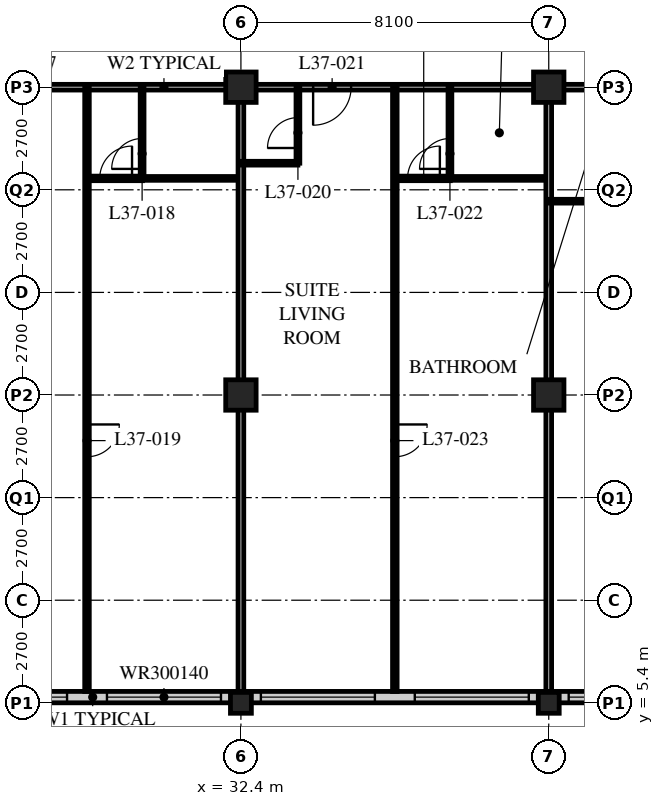
"""IFC4 building model, lengths in metres.
Left out: names, types, materials, properties, quantities, classifications, styles, units other than length and angle.
Written with IfcOpenShell. Run it as: python <this file> out.ifc"""

import sys

from ifc_helpers import new_model, si_unit, direction, frame, frame_2d, origin, origin_2d, place, context, subcontext, project, spatial, rectangle, hollow_rectangle, extrude, element, fill, save


model = new_model("IFC4")
c1 = context("Model", 3, precision=1e-05, world=origin(), true_north=direction((0.0, 1.0)))
c2 = subcontext(c1, "Body", "Model", "MODEL_VIEW")
j1 = project(units=[si_unit("LENGTHUNIT", "METRE"), si_unit("PLANEANGLEUNIT", "RADIAN")], contexts=[c1])
p1 = place(None, origin())
s1 = spatial("IfcSite", under=j1, at=p1, CompositionType="ELEMENT")
p2 = place(p1, origin())
s2 = spatial("IfcBuilding", under=s1, at=p2, CompositionType="ELEMENT")
p3 = place(p2, frame((0.0, 0.0, 144.2)))
s3 = spatial("IfcBuildingStorey", under=s2, at=p3, CompositionType="ELEMENT", Elevation=144.2)
p4 = place(p3, frame((32.4, 5.4, 0.0), z_axis=(0.0, 0.0, 1.0), x_axis=(1.0, 0.0, 0.0)))
e1 = element("IfcColumn", 1, at=p4, inside=s3, PredefinedType="COLUMN", context=c2, shape_type="SweptSolid", body=[
    extrude(hollow_rectangle(XDim=0.55, YDim=0.55, WallThickness=0.04, at=origin_2d()), origin(), (0.0, 0.0, 1.0), 3.4),
])
for number, where, z_axis, x_axis in (
    (2, (32.4, 13.5, 0.0), (0.0, 0.0, 1.0), (1.0, 0.0, 0.0)),
    (3, (32.4, 21.6, 0.0), (0.0, 0.0, 1.0), (1.0, 0.0, 0.0)),
):
    element("IfcColumn", number, at=place(p3, frame(where, z_axis=z_axis, x_axis=x_axis)), inside=s3, PredefinedType="COLUMN", context=c2, shape_type="SweptSolid", body=[
        extrude(hollow_rectangle(XDim=0.8, YDim=0.8, WallThickness=0.08, at=origin_2d()), origin(), (0.0, 0.0, 1.0), 3.4),
    ])
p5 = place(p3, frame((40.5, 5.4, 0.0), z_axis=(0.0, 0.0, 1.0), x_axis=(1.0, 0.0, 0.0)))
e4 = element("IfcColumn", 4, at=p5, inside=s3, PredefinedType="COLUMN", context=c2, shape_type="SweptSolid", body=[
    extrude(hollow_rectangle(XDim=0.55, YDim=0.55, WallThickness=0.04, at=origin_2d()), origin(), (0.0, 0.0, 1.0), 3.4),
])
for number, where, z_axis, x_axis in (
    (5, (40.5, 13.5, 0.0), (0.0, 0.0, 1.0), (1.0, 0.0, 0.0)),
    (6, (40.5, 21.6, 0.0), (0.0, 0.0, 1.0), (1.0, 0.0, 0.0)),
):
    element("IfcColumn", number, at=place(p3, frame(where, z_axis=z_axis, x_axis=x_axis)), inside=s3, PredefinedType="COLUMN", context=c2, shape_type="SweptSolid", body=[
        extrude(hollow_rectangle(XDim=0.8, YDim=0.8, WallThickness=0.08, at=origin_2d()), origin(), (0.0, 0.0, 1.0), 3.4),
    ])
p6 = place(p3, frame((8.4, 5.55, 0.0), z_axis=(0.0, 0.0, 1.0), x_axis=(1.0, 0.0, 0.0)))
e7 = element("IfcWall", 7, at=p6, inside=s3, PredefinedType="SOLIDWALL", context=c2, shape_type="SweptSolid", body=[
    extrude(rectangle(XDim=40.2, YDim=0.3, at=frame_2d((20.1, 0.0))), origin(), (0.0, 0.0, 1.0), 3.19),
])
p7 = place(p6, frame((0.225, 0.0, 0.9)))
e8 = element("IfcOpeningElement", 8, at=p7, cuts=e7, PredefinedType="OPENING", context=c2, shape_type="SweptSolid", body=[
    extrude(rectangle(XDim=3.0, YDim=1.4, at=frame_2d((1.5, 0.7))), frame((0.0, 0.16, 0.0), z_axis=(0.0, -1.0, 0.0), x_axis=(1.0, 0.0, 0.0)), (0.0, 0.0, 1.0), 0.32),
])
p8 = place(p6, frame((4.275, 0.0, 0.9)))
e9 = element("IfcOpeningElement", 9, at=p8, cuts=e7, PredefinedType="OPENING", context=c2, shape_type="SweptSolid", body=[
    extrude(rectangle(XDim=3.0, YDim=1.4, at=frame_2d((1.5, 0.7))), frame((0.0, 0.16, 0.0), z_axis=(0.0, -1.0, 0.0), x_axis=(1.0, 0.0, 0.0)), (0.0, 0.0, 1.0), 0.32),
])
p9 = place(p6, frame((8.325, 0.0, 0.9)))
e10 = element("IfcOpeningElement", 10, at=p9, cuts=e7, PredefinedType="OPENING", context=c2, shape_type="SweptSolid", body=[
    extrude(rectangle(XDim=3.0, YDim=1.4, at=frame_2d((1.5, 0.7))), frame((0.0, 0.16, 0.0), z_axis=(0.0, -1.0, 0.0), x_axis=(1.0, 0.0, 0.0)), (0.0, 0.0, 1.0), 0.32),
])
p10 = place(p6, frame((12.375, 0.0, 0.9)))
e11 = element("IfcOpeningElement", 11, at=p10, cuts=e7, PredefinedType="OPENING", context=c2, shape_type="SweptSolid", body=[
    extrude(rectangle(XDim=3.0, YDim=1.4, at=frame_2d((1.5, 0.7))), frame((0.0, 0.16, 0.0), z_axis=(0.0, -1.0, 0.0), x_axis=(1.0, 0.0, 0.0)), (0.0, 0.0, 1.0), 0.32),
])
p11 = place(p6, frame((16.425, 0.0, 0.9)))
e12 = element("IfcOpeningElement", 12, at=p11, cuts=e7, PredefinedType="OPENING", context=c2, shape_type="SweptSolid", body=[
    extrude(rectangle(XDim=3.0, YDim=1.4, at=frame_2d((1.5, 0.7))), frame((0.0, 0.16, 0.0), z_axis=(0.0, -1.0, 0.0), x_axis=(1.0, 0.0, 0.0)), (0.0, 0.0, 1.0), 0.32),
])
p12 = place(p6, frame((20.475, 0.0, 0.9)))
e13 = element("IfcOpeningElement", 13, at=p12, cuts=e7, PredefinedType="OPENING", context=c2, shape_type="SweptSolid", body=[
    extrude(rectangle(XDim=3.0, YDim=1.4, at=frame_2d((1.5, 0.7))), frame((0.0, 0.16, 0.0), z_axis=(0.0, -1.0, 0.0), x_axis=(1.0, 0.0, 0.0)), (0.0, 0.0, 1.0), 0.32),
])
p13 = place(p6, frame((24.525, 0.0, 0.9)))
e14 = element("IfcOpeningElement", 14, at=p13, cuts=e7, PredefinedType="OPENING", context=c2, shape_type="SweptSolid", body=[
    extrude(rectangle(XDim=3.0, YDim=1.4, at=frame_2d((1.5, 0.7))), frame((0.0, 0.16, 0.0), z_axis=(0.0, -1.0, 0.0), x_axis=(1.0, 0.0, 0.0)), (0.0, 0.0, 1.0), 0.32),
])
p14 = place(p6, frame((28.575, 0.0, 0.9)))
e15 = element("IfcOpeningElement", 15, at=p14, cuts=e7, PredefinedType="OPENING", context=c2, shape_type="SweptSolid", body=[
    extrude(rectangle(XDim=3.0, YDim=1.4, at=frame_2d((1.5, 0.7))), frame((0.0, 0.16, 0.0), z_axis=(0.0, -1.0, 0.0), x_axis=(1.0, 0.0, 0.0)), (0.0, 0.0, 1.0), 0.32),
])
p15 = place(p6, frame((32.625, 0.0, 0.9)))
e16 = element("IfcOpeningElement", 16, at=p15, cuts=e7, PredefinedType="OPENING", context=c2, shape_type="SweptSolid", body=[
    extrude(rectangle(XDim=3.0, YDim=1.4, at=frame_2d((1.5, 0.7))), frame((0.0, 0.16, 0.0), z_axis=(0.0, -1.0, 0.0), x_axis=(1.0, 0.0, 0.0)), (0.0, 0.0, 1.0), 0.32),
])
p16 = place(p6, frame((36.675, 0.0, 0.9)))
e17 = element("IfcOpeningElement", 17, at=p16, cuts=e7, PredefinedType="OPENING", context=c2, shape_type="SweptSolid", body=[
    extrude(rectangle(XDim=3.0, YDim=1.4, at=frame_2d((1.5, 0.7))), frame((0.0, 0.16, 0.0), z_axis=(0.0, -1.0, 0.0), x_axis=(1.0, 0.0, 0.0)), (0.0, 0.0, 1.0), 0.32),
])
p17 = place(p3, frame((12.15, 21.6, 0.0), z_axis=(0.0, 0.0, 1.0), x_axis=(1.0, 0.0, 0.0)))
e18 = element("IfcWall", 18, at=p17, inside=s3, PredefinedType="PARTITIONING", context=c2, shape_type="SweptSolid", body=[
    extrude(rectangle(XDim=36.45, YDim=0.15, at=frame_2d((18.225, 0.0))), origin(), (0.0, 0.0, 1.0), 2.42),
])
p18 = place(p17, frame((5.95, 0.0, 0.0)))
e19 = element("IfcOpeningElement", 19, at=p18, cuts=e18, PredefinedType="OPENING", context=c2, shape_type="SweptSolid", body=[
    extrude(rectangle(XDim=1.0, YDim=2.1, at=frame_2d((0.5, 1.05))), frame((0.0, 0.085, 0.0), z_axis=(0.0, -1.0, 0.0), x_axis=(1.0, 0.0, 0.0)), (0.0, 0.0, 1.0), 0.17),
])
p19 = place(p17, frame((14.05, 0.0, 0.0)))
e20 = element("IfcOpeningElement", 20, at=p19, cuts=e18, PredefinedType="OPENING", context=c2, shape_type="SweptSolid", body=[
    extrude(rectangle(XDim=1.0, YDim=2.1, at=frame_2d((0.5, 1.05))), frame((0.0, 0.085, 0.0), z_axis=(0.0, -1.0, 0.0), x_axis=(1.0, 0.0, 0.0)), (0.0, 0.0, 1.0), 0.17),
])
p20 = place(p17, frame((22.15, 0.0, 0.0)))
e21 = element("IfcOpeningElement", 21, at=p20, cuts=e18, PredefinedType="OPENING", context=c2, shape_type="SweptSolid", body=[
    extrude(rectangle(XDim=1.0, YDim=2.1, at=frame_2d((0.5, 1.05))), frame((0.0, 0.085, 0.0), z_axis=(0.0, -1.0, 0.0), x_axis=(1.0, 0.0, 0.0)), (0.0, 0.0, 1.0), 0.17),
])
p21 = place(p17, frame((30.8, 0.0, 0.0)))
e22 = element("IfcOpeningElement", 22, at=p21, cuts=e18, PredefinedType="OPENING", context=c2, shape_type="SweptSolid", body=[
    extrude(rectangle(XDim=1.0, YDim=2.1, at=frame_2d((0.5, 1.05))), frame((0.0, 0.085, 0.0), z_axis=(0.0, -1.0, 0.0), x_axis=(1.0, 0.0, 0.0)), (0.0, 0.0, 1.0), 0.17),
])
p22 = place(p17, frame((1.525, 0.0, 0.0)))
e23 = element("IfcOpeningElement", 23, at=p22, cuts=e18, PredefinedType="OPENING", context=c2, shape_type="SweptSolid", body=[
    extrude(rectangle(XDim=1.0, YDim=2.1, at=frame_2d((0.5, 1.05))), frame((0.0, 0.085, 0.0), z_axis=(0.0, -1.0, 0.0), x_axis=(1.0, 0.0, 0.0)), (0.0, 0.0, 1.0), 0.17),
])
p23 = place(p17, frame((33.925, 0.0, 0.0)))
e24 = element("IfcOpeningElement", 24, at=p23, cuts=e18, PredefinedType="OPENING", context=c2, shape_type="SweptSolid", body=[
    extrude(rectangle(XDim=1.0, YDim=2.1, at=frame_2d((0.5, 1.05))), frame((0.0, 0.085, 0.0), z_axis=(0.0, -1.0, 0.0), x_axis=(1.0, 0.0, 0.0)), (0.0, 0.0, 1.0), 0.17),
])
p24 = place(p3, frame((29.8, 19.2, 0.0), z_axis=(0.0, 0.0, 1.0), x_axis=(1.0, 0.0, 0.0)))
e25 = element("IfcWall", 25, at=p24, inside=s3, PredefinedType="PARTITIONING", context=c2, shape_type="SweptSolid", body=[
    extrude(rectangle(XDim=2.6, YDim=0.1, at=frame_2d((1.3, 0.0))), origin(), (0.0, 0.0, 1.0), 3.19),
])
p25 = place(p3, frame((29.8, 21.6, 0.0), z_axis=(0.0, 0.0, 1.0), x_axis=(0.0, -1.0, 0.0)))
e26 = element("IfcWall", 26, at=p25, inside=s3, PredefinedType="PARTITIONING", context=c2, shape_type="SweptSolid", body=[
    extrude(rectangle(XDim=2.4, YDim=0.1, at=frame_2d((1.2, 0.0))), origin(), (0.0, 0.0, 1.0), 3.19),
])
p26 = place(p25, frame((1.35, 0.0, 0.0)))
e27 = element("IfcOpeningElement", 27, at=p26, cuts=e26, PredefinedType="OPENING", context=c2, shape_type="SweptSolid", body=[
    extrude(rectangle(XDim=0.8, YDim=2.1, at=frame_2d((0.4, 1.05))), frame((0.0, 0.06, 0.0), z_axis=(0.0, -1.0, 0.0), x_axis=(1.0, 0.0, 0.0)), (0.0, 0.0, 1.0), 0.12),
])
p27 = place(p3, frame((28.35, 21.6, 0.0), z_axis=(0.0, 0.0, 1.0), x_axis=(0.0, -1.0, 0.0)))
e28 = element("IfcWall", 28, at=p27, inside=s3, PredefinedType="PARTITIONING", context=c2, shape_type="SweptSolid", body=[
    extrude(rectangle(XDim=15.9, YDim=0.12, at=frame_2d((7.95, 0.0))), origin(), (0.0, 0.0, 1.0), 3.19),
])
p28 = place(p27, frame((8.875, 0.0, 0.0)))
e29 = element("IfcOpeningElement", 29, at=p28, cuts=e28, PredefinedType="OPENING", context=c2, shape_type="SweptSolid", body=[
    extrude(rectangle(XDim=0.85, YDim=2.1, at=frame_2d((0.425, 1.05))), frame((0.0, 0.07, 0.0), z_axis=(0.0, -1.0, 0.0), x_axis=(1.0, 0.0, 0.0)), (0.0, 0.0, 1.0), 0.14),
])
p29 = place(p3, frame((32.4, 21.6, 0.0), z_axis=(0.0, 0.0, 1.0), x_axis=(0.0, -1.0, 0.0)))
e30 = element("IfcWall", 30, at=p29, inside=s3, PredefinedType="PARTITIONING", context=c2, shape_type="SweptSolid", body=[
    extrude(rectangle(XDim=15.9, YDim=0.15, at=frame_2d((7.95, 0.0))), origin(), (0.0, 0.0, 1.0), 2.42),
])
p30 = place(p3, frame((32.4, 19.6, 0.0), z_axis=(0.0, 0.0, 1.0), x_axis=(1.0, 0.0, 0.0)))
e31 = element("IfcWall", 31, at=p30, inside=s3, PredefinedType="PARTITIONING", context=c2, shape_type="SweptSolid", body=[
    extrude(rectangle(XDim=1.5, YDim=0.1, at=frame_2d((0.75, 0.0))), origin(), (0.0, 0.0, 1.0), 3.19),
])
p31 = place(p3, frame((33.9, 21.6, 0.0), z_axis=(0.0, 0.0, 1.0), x_axis=(0.0, -1.0, 0.0)))
e32 = element("IfcWall", 32, at=p31, inside=s3, PredefinedType="PARTITIONING", context=c2, shape_type="SweptSolid", body=[
    extrude(rectangle(XDim=2.0, YDim=0.1, at=frame_2d((1.0, 0.0))), origin(), (0.0, 0.0, 1.0), 3.19),
])
p32 = place(p31, frame((0.8, 0.0, 0.0)))
e33 = element("IfcOpeningElement", 33, at=p32, cuts=e32, PredefinedType="OPENING", context=c2, shape_type="SweptSolid", body=[
    extrude(rectangle(XDim=0.8, YDim=2.1, at=frame_2d((0.4, 1.05))), frame((0.0, 0.06, 0.0), z_axis=(0.0, -1.0, 0.0), x_axis=(1.0, 0.0, 0.0)), (0.0, 0.0, 1.0), 0.12),
])
p33 = place(p3, frame((37.9, 19.2, 0.0), z_axis=(0.0, 0.0, 1.0), x_axis=(1.0, 0.0, 0.0)))
e34 = element("IfcWall", 34, at=p33, inside=s3, PredefinedType="PARTITIONING", context=c2, shape_type="SweptSolid", body=[
    extrude(rectangle(XDim=2.6, YDim=0.1, at=frame_2d((1.3, 0.0))), origin(), (0.0, 0.0, 1.0), 3.19),
])
p34 = place(p3, frame((37.9, 21.6, 0.0), z_axis=(0.0, 0.0, 1.0), x_axis=(0.0, -1.0, 0.0)))
e35 = element("IfcWall", 35, at=p34, inside=s3, PredefinedType="PARTITIONING", context=c2, shape_type="SweptSolid", body=[
    extrude(rectangle(XDim=2.4, YDim=0.1, at=frame_2d((1.2, 0.0))), origin(), (0.0, 0.0, 1.0), 3.19),
])
p35 = place(p34, frame((1.35, 0.0, 0.0)))
e36 = element("IfcOpeningElement", 36, at=p35, cuts=e35, PredefinedType="OPENING", context=c2, shape_type="SweptSolid", body=[
    extrude(rectangle(XDim=0.8, YDim=2.1, at=frame_2d((0.4, 1.05))), frame((0.0, 0.06, 0.0), z_axis=(0.0, -1.0, 0.0), x_axis=(1.0, 0.0, 0.0)), (0.0, 0.0, 1.0), 0.12),
])
p36 = place(p3, frame((36.45, 21.6, 0.0), z_axis=(0.0, 0.0, 1.0), x_axis=(0.0, -1.0, 0.0)))
e37 = element("IfcWall", 37, at=p36, inside=s3, PredefinedType="PARTITIONING", context=c2, shape_type="SweptSolid", body=[
    extrude(rectangle(XDim=15.9, YDim=0.12, at=frame_2d((7.95, 0.0))), origin(), (0.0, 0.0, 1.0), 3.19),
])
p37 = place(p36, frame((8.875, 0.0, 0.0)))
e38 = element("IfcOpeningElement", 38, at=p37, cuts=e37, PredefinedType="OPENING", context=c2, shape_type="SweptSolid", body=[
    extrude(rectangle(XDim=0.85, YDim=2.1, at=frame_2d((0.425, 1.05))), frame((0.0, 0.07, 0.0), z_axis=(0.0, -1.0, 0.0), x_axis=(1.0, 0.0, 0.0)), (0.0, 0.0, 1.0), 0.14),
])
p38 = place(p3, frame((40.5, 21.6, 0.0), z_axis=(0.0, 0.0, 1.0), x_axis=(0.0, -1.0, 0.0)))
e39 = element("IfcWall", 39, at=p38, inside=s3, PredefinedType="PARTITIONING", context=c2, shape_type="SweptSolid", body=[
    extrude(rectangle(XDim=15.9, YDim=0.15, at=frame_2d((7.95, 0.0))), origin(), (0.0, 0.0, 1.0), 2.42),
])
p39 = place(p3, frame((40.5, 18.6, 0.0), z_axis=(0.0, 0.0, 1.0), x_axis=(1.0, 0.0, 0.0)))
e40 = element("IfcWall", 40, at=p39, inside=s3, PredefinedType="PARTITIONING", context=c2, shape_type="SweptSolid", body=[
    extrude(rectangle(XDim=2.3, YDim=0.1, at=frame_2d((1.15, 0.0))), origin(), (0.0, 0.0, 1.0), 3.19),
])
p40 = place(p3, frame((29.81, 19.2, 0.0), z_axis=(0.0, 0.0, 1.0), x_axis=(-1.0, 0.0, 0.0)))
e41 = element("IfcWall", 41, at=p40, inside=s3, PredefinedType="PARTITIONING", context=c2, shape_type="SweptSolid", body=[
    extrude(rectangle(XDim=1.46, YDim=0.12, at=frame_2d((0.73, 0.0))), origin(), (0.0, 0.0, 1.0), 3.19),
])
p41 = place(p40, frame((0.275, 0.0, 0.0)))
e42 = element("IfcOpeningElement", 42, at=p41, cuts=e41, PredefinedType="OPENING", context=c2, shape_type="SweptSolid", body=[
    extrude(rectangle(XDim=0.85, YDim=2.1, at=frame_2d((0.425, 1.05))), frame((0.0, 0.07, 0.0), z_axis=(0.0, -1.0, 0.0), x_axis=(1.0, 0.0, 0.0)), (0.0, 0.0, 1.0), 0.14),
])
p42 = place(p3, frame((37.91, 19.2, 0.0), z_axis=(0.0, 0.0, 1.0), x_axis=(-1.0, 0.0, 0.0)))
e43 = element("IfcWall", 43, at=p42, inside=s3, PredefinedType="PARTITIONING", context=c2, shape_type="SweptSolid", body=[
    extrude(rectangle(XDim=1.46, YDim=0.12, at=frame_2d((0.73, 0.0))), origin(), (0.0, 0.0, 1.0), 3.19),
])
p43 = place(p42, frame((0.275, 0.0, 0.0)))
e44 = element("IfcOpeningElement", 44, at=p43, cuts=e43, PredefinedType="OPENING", context=c2, shape_type="SweptSolid", body=[
    extrude(rectangle(XDim=0.85, YDim=2.1, at=frame_2d((0.425, 1.05))), frame((0.0, 0.07, 0.0), z_axis=(0.0, -1.0, 0.0), x_axis=(1.0, 0.0, 0.0)), (0.0, 0.0, 1.0), 0.14),
])
p44 = place(p11, origin())
e45 = element("IfcWindow", 45, at=p44, inside=s3, PartitioningType="SINGLE_PANEL", PredefinedType="WINDOW", context=c2, shape_type="SweptSolid", body=[
    extrude(rectangle(XDim=3.0, YDim=1.4, at=frame_2d((1.5, 0.7))), frame((0.0, 0.03, 0.0), z_axis=(0.0, -1.0, 0.0), x_axis=(1.0, 0.0, 0.0)), (0.0, 0.0, 1.0), 0.06),
])
fill(e12, e45)
p45 = place(p12, origin())
e46 = element("IfcWindow", 46, at=p45, inside=s3, PartitioningType="SINGLE_PANEL", PredefinedType="WINDOW", context=c2, shape_type="SweptSolid", body=[
    extrude(rectangle(XDim=3.0, YDim=1.4, at=frame_2d((1.5, 0.7))), frame((0.0, 0.03, 0.0), z_axis=(0.0, -1.0, 0.0), x_axis=(1.0, 0.0, 0.0)), (0.0, 0.0, 1.0), 0.06),
])
fill(e13, e46)
p46 = place(p13, origin())
e47 = element("IfcWindow", 47, at=p46, inside=s3, PartitioningType="SINGLE_PANEL", PredefinedType="WINDOW", context=c2, shape_type="SweptSolid", body=[
    extrude(rectangle(XDim=3.0, YDim=1.4, at=frame_2d((1.5, 0.7))), frame((0.0, 0.03, 0.0), z_axis=(0.0, -1.0, 0.0), x_axis=(1.0, 0.0, 0.0)), (0.0, 0.0, 1.0), 0.06),
])
fill(e14, e47)
p47 = place(p14, origin())
e48 = element("IfcWindow", 48, at=p47, inside=s3, PartitioningType="SINGLE_PANEL", PredefinedType="WINDOW", context=c2, shape_type="SweptSolid", body=[
    extrude(rectangle(XDim=3.0, YDim=1.4, at=frame_2d((1.5, 0.7))), frame((0.0, 0.03, 0.0), z_axis=(0.0, -1.0, 0.0), x_axis=(1.0, 0.0, 0.0)), (0.0, 0.0, 1.0), 0.06),
])
fill(e15, e48)
p48 = place(p15, origin())
e49 = element("IfcWindow", 49, at=p48, inside=s3, PartitioningType="SINGLE_PANEL", PredefinedType="WINDOW", context=c2, shape_type="SweptSolid", body=[
    extrude(rectangle(XDim=3.0, YDim=1.4, at=frame_2d((1.5, 0.7))), frame((0.0, 0.03, 0.0), z_axis=(0.0, -1.0, 0.0), x_axis=(1.0, 0.0, 0.0)), (0.0, 0.0, 1.0), 0.06),
])
fill(e16, e49)
p49 = place(p26, origin())
e50 = element("IfcDoor", 50, at=p49, inside=s3, OperationType="SINGLE_SWING_LEFT", PredefinedType="DOOR", context=c2, shape_type="SweptSolid", body=[
    extrude(rectangle(XDim=0.8, YDim=2.1, at=frame_2d((0.4, 1.05))), frame((0.0, 0.025, 0.0), z_axis=(0.0, -1.0, 0.0), x_axis=(1.0, 0.0, 0.0)), (0.0, 0.0, 1.0), 0.05),
])
fill(e27, e50)
p50 = place(p28, origin())
e51 = element("IfcDoor", 51, at=p50, inside=s3, OperationType="SINGLE_SWING_LEFT", PredefinedType="DOOR", context=c2, shape_type="SweptSolid", body=[
    extrude(rectangle(XDim=0.85, YDim=2.1, at=frame_2d((0.425, 1.05))), frame((0.0, 0.025, 0.0), z_axis=(0.0, -1.0, 0.0), x_axis=(1.0, 0.0, 0.0)), (0.0, 0.0, 1.0), 0.05),
])
fill(e29, e51)
p51 = place(p32, origin())
e52 = element("IfcDoor", 52, at=p51, inside=s3, OperationType="SINGLE_SWING_LEFT", PredefinedType="DOOR", context=c2, shape_type="SweptSolid", body=[
    extrude(rectangle(XDim=0.8, YDim=2.1, at=frame_2d((0.4, 1.05))), frame((0.0, 0.025, 0.0), z_axis=(0.0, -1.0, 0.0), x_axis=(1.0, 0.0, 0.0)), (0.0, 0.0, 1.0), 0.05),
])
fill(e33, e52)
p52 = place(p20, origin())
e53 = element("IfcDoor", 53, at=p52, inside=s3, OperationType="SINGLE_SWING_RIGHT", PredefinedType="DOOR", context=c2, shape_type="SweptSolid", body=[
    extrude(rectangle(XDim=1.0, YDim=2.1, at=frame_2d((0.5, 1.05))), frame((0.0, 0.025, 0.0), z_axis=(0.0, -1.0, 0.0), x_axis=(1.0, 0.0, 0.0)), (0.0, 0.0, 1.0), 0.05),
])
fill(e21, e53)
p53 = place(p35, origin())
e54 = element("IfcDoor", 54, at=p53, inside=s3, OperationType="SINGLE_SWING_LEFT", PredefinedType="DOOR", context=c2, shape_type="SweptSolid", body=[
    extrude(rectangle(XDim=0.8, YDim=2.1, at=frame_2d((0.4, 1.05))), frame((0.0, 0.025, 0.0), z_axis=(0.0, -1.0, 0.0), x_axis=(1.0, 0.0, 0.0)), (0.0, 0.0, 1.0), 0.05),
])
fill(e36, e54)
p54 = place(p37, origin())
e55 = element("IfcDoor", 55, at=p54, inside=s3, OperationType="SINGLE_SWING_LEFT", PredefinedType="DOOR", context=c2, shape_type="SweptSolid", body=[
    extrude(rectangle(XDim=0.85, YDim=2.1, at=frame_2d((0.425, 1.05))), frame((0.0, 0.025, 0.0), z_axis=(0.0, -1.0, 0.0), x_axis=(1.0, 0.0, 0.0)), (0.0, 0.0, 1.0), 0.05),
])
fill(e38, e55)
p55 = place(p41, origin())
e56 = element("IfcDoor", 56, at=p55, inside=s3, OperationType="SINGLE_SWING_RIGHT", PredefinedType="DOOR", context=c2, shape_type="SweptSolid", body=[
    extrude(rectangle(XDim=0.85, YDim=2.1, at=frame_2d((0.425, 1.05))), frame((0.0, 0.025, 0.0), z_axis=(0.0, -1.0, 0.0), x_axis=(1.0, 0.0, 0.0)), (0.0, 0.0, 1.0), 0.05),
])
fill(e42, e56)
p56 = place(p43, origin())
e57 = element("IfcDoor", 57, at=p56, inside=s3, OperationType="SINGLE_SWING_RIGHT", PredefinedType="DOOR", context=c2, shape_type="SweptSolid", body=[
    extrude(rectangle(XDim=0.85, YDim=2.1, at=frame_2d((0.425, 1.05))), frame((0.0, 0.025, 0.0), z_axis=(0.0, -1.0, 0.0), x_axis=(1.0, 0.0, 0.0)), (0.0, 0.0, 1.0), 0.05),
])
fill(e44, e57)
save(model, sys.argv[1])
